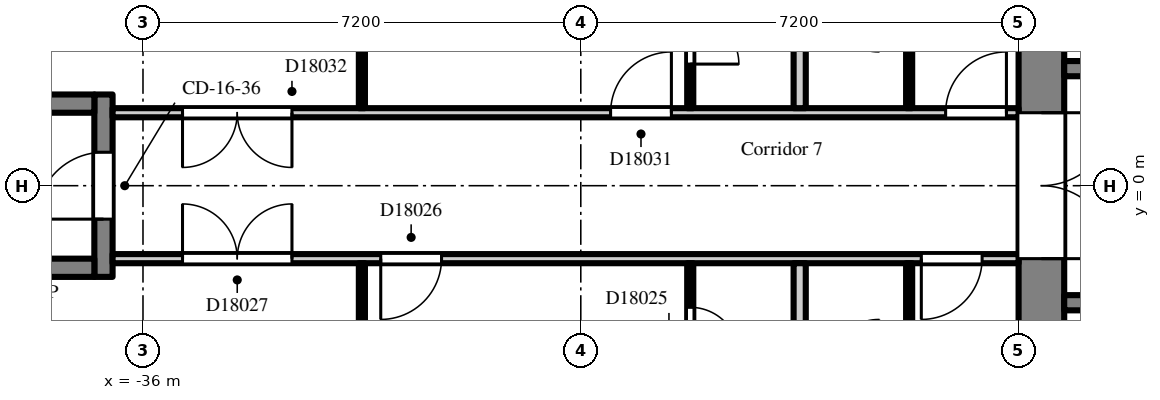
"""IFC4 building model, lengths in metres.
Left out: names, types, materials, properties, quantities, classifications, styles, units other than length and angle.
Written with IfcOpenShell. Run it as: python <this file> out.ifc"""

import sys

from ifc_helpers import new_model, si_unit, direction, frame, frame_2d, origin, place, context, subcontext, project, spatial, rectangle, extrude, element, fill, save


model = new_model("IFC4")
c1 = context("Model", 3, precision=1e-05, world=origin(), true_north=direction((0.0, 1.0)))
c2 = subcontext(c1, "Body", "Model", "MODEL_VIEW")
j1 = project(units=[si_unit("LENGTHUNIT", "METRE"), si_unit("PLANEANGLEUNIT", "RADIAN")], contexts=[c1])
p1 = place(None, origin())
s1 = spatial("IfcSite", under=j1, at=p1, CompositionType="ELEMENT")
p2 = place(p1, origin())
s2 = spatial("IfcBuilding", under=s1, at=p2, CompositionType="ELEMENT")
p3 = place(p2, frame((0.0, 0.0, 123.3)))
s3 = spatial("IfcBuildingStorey", under=s2, at=p3, CompositionType="ELEMENT", Elevation=123.3)
p4 = place(p3, frame((-21.225, -7.2, 0.0), z_axis=(0.0, 0.0, 1.0), x_axis=(0.0, 1.0, 0.0)))
e1 = element("IfcWall", 1, at=p4, inside=s3, PredefinedType="SHEAR", context=c2, shape_type="SweptSolid", body=[
    extrude(rectangle(XDim=14.4, YDim=0.75, at=frame_2d((7.2, 0.0))), origin(), (0.0, 0.0, 1.0), 2.6),
])
p5 = place(p4, frame((6.0, 0.0, 0.0)))
e2 = element("IfcOpeningElement", 2, at=p5, cuts=e1, PredefinedType="OPENING", context=c2, shape_type="SweptSolid", body=[
    extrude(rectangle(XDim=2.4, YDim=2.2, at=frame_2d((1.2, 1.1))), frame((0.0, 0.385, 0.0), z_axis=(0.0, -1.0, 0.0), x_axis=(1.0, 0.0, 0.0)), (0.0, 0.0, 1.0), 0.77),
])
p6 = place(p3, frame((-7.9, 1.925, 0.0), z_axis=(0.0, 0.0, 1.0), x_axis=(-1.0, 0.0, 0.0)))
e3 = element("IfcWall", 3, at=p6, inside=s3, PredefinedType="SHEAR", context=c2, shape_type="SweptSolid", body=[
    extrude(rectangle(XDim=12.95, YDim=0.25, at=frame_2d((6.475, 0.0))), origin(), (0.0, 0.0, 1.0), 2.6),
])
p7 = place(p6, frame((4.825, 0.0, 0.0)))
e4 = element("IfcOpeningElement", 4, at=p7, cuts=e3, PredefinedType="OPENING", context=c2, shape_type="SweptSolid", body=[
    extrude(rectangle(XDim=1.1, YDim=2.1, at=frame_2d((0.55, 1.05))), frame((0.0, 0.135, 0.0), z_axis=(0.0, -1.0, 0.0), x_axis=(1.0, 0.0, 0.0)), (0.0, 0.0, 1.0), 0.27),
])
p8 = place(p6, frame((7.025, 0.0, 0.0)))
e5 = element("IfcOpeningElement", 5, at=p8, cuts=e3, PredefinedType="OPENING", context=c2, shape_type="SweptSolid", body=[
    extrude(rectangle(XDim=1.1, YDim=2.1, at=frame_2d((0.55, 1.05))), frame((0.0, 0.135, 0.0), z_axis=(0.0, -1.0, 0.0), x_axis=(1.0, 0.0, 0.0)), (0.0, 0.0, 1.0), 0.27),
])
p9 = place(p6, frame((9.225, 0.0, 0.0)))
e6 = element("IfcOpeningElement", 6, at=p9, cuts=e3, PredefinedType="OPENING", context=c2, shape_type="SweptSolid", body=[
    extrude(rectangle(XDim=1.1, YDim=2.1, at=frame_2d((0.55, 1.05))), frame((0.0, 0.135, 0.0), z_axis=(0.0, -1.0, 0.0), x_axis=(1.0, 0.0, 0.0)), (0.0, 0.0, 1.0), 0.27),
])
p10 = place(p6, frame((0.525, 0.0, 0.0)))
e7 = element("IfcOpeningElement", 7, at=p10, cuts=e3, PredefinedType="OPENING", context=c2, shape_type="SweptSolid", body=[
    extrude(rectangle(XDim=0.9, YDim=2.1, at=frame_2d((0.45, 1.05))), frame((0.0, 0.135, 0.0), z_axis=(0.0, -1.0, 0.0), x_axis=(1.0, 0.0, 0.0)), (0.0, 0.0, 1.0), 0.27),
])
p11 = place(p6, frame((2.625, 0.0, 0.0)))
e8 = element("IfcOpeningElement", 8, at=p11, cuts=e3, PredefinedType="OPENING", context=c2, shape_type="SweptSolid", body=[
    extrude(rectangle(XDim=1.1, YDim=2.1, at=frame_2d((0.55, 1.05))), frame((0.0, 0.135, 0.0), z_axis=(0.0, -1.0, 0.0), x_axis=(1.0, 0.0, 0.0)), (0.0, 0.0, 1.0), 0.27),
])
p12 = place(p6, frame((11.525, 0.0, 0.0)))
e9 = element("IfcOpeningElement", 9, at=p12, cuts=e3, PredefinedType="OPENING", context=c2, shape_type="SweptSolid", body=[
    extrude(rectangle(XDim=0.9, YDim=2.1, at=frame_2d((0.45, 1.05))), frame((0.0, 0.135, 0.0), z_axis=(0.0, -1.0, 0.0), x_axis=(1.0, 0.0, 0.0)), (0.0, 0.0, 1.0), 0.27),
])
p13 = place(p3, frame((-7.9, -1.925, 0.0), z_axis=(0.0, 0.0, 1.0), x_axis=(-1.0, 0.0, 0.0)))
e10 = element("IfcWall", 10, at=p13, inside=s3, PredefinedType="SHEAR", context=c2, shape_type="SweptSolid", body=[
    extrude(rectangle(XDim=12.95, YDim=0.25, at=frame_2d((6.475, 0.0))), origin(), (0.0, 0.0, 1.0), 2.6),
])
p14 = place(p13, frame((0.525, 0.0, 0.0)))
e11 = element("IfcOpeningElement", 11, at=p14, cuts=e10, PredefinedType="OPENING", context=c2, shape_type="SweptSolid", body=[
    extrude(rectangle(XDim=0.9, YDim=2.1, at=frame_2d((0.45, 1.05))), frame((0.0, 0.135, 0.0), z_axis=(0.0, -1.0, 0.0), x_axis=(1.0, 0.0, 0.0)), (0.0, 0.0, 1.0), 0.27),
])
p15 = place(p13, frame((2.625, 0.0, 0.0)))
e12 = element("IfcOpeningElement", 12, at=p15, cuts=e10, PredefinedType="OPENING", context=c2, shape_type="SweptSolid", body=[
    extrude(rectangle(XDim=1.1, YDim=2.1, at=frame_2d((0.55, 1.05))), frame((0.0, 0.135, 0.0), z_axis=(0.0, -1.0, 0.0), x_axis=(1.0, 0.0, 0.0)), (0.0, 0.0, 1.0), 0.27),
])
p16 = place(p13, frame((4.925, 0.0, 0.0)))
e13 = element("IfcOpeningElement", 13, at=p16, cuts=e10, PredefinedType="OPENING", context=c2, shape_type="SweptSolid", body=[
    extrude(rectangle(XDim=0.9, YDim=2.1, at=frame_2d((0.45, 1.05))), frame((0.0, 0.135, 0.0), z_axis=(0.0, -1.0, 0.0), x_axis=(1.0, 0.0, 0.0)), (0.0, 0.0, 1.0), 0.27),
])
p17 = place(p13, frame((8.225, 0.0, 0.0)))
e14 = element("IfcOpeningElement", 14, at=p17, cuts=e10, PredefinedType="OPENING", context=c2, shape_type="SweptSolid", body=[
    extrude(rectangle(XDim=0.9, YDim=2.1, at=frame_2d((0.45, 1.05))), frame((0.0, 0.135, 0.0), z_axis=(0.0, -1.0, 0.0), x_axis=(1.0, 0.0, 0.0)), (0.0, 0.0, 1.0), 0.27),
])
p18 = place(p13, frame((11.525, 0.0, 0.0)))
e15 = element("IfcOpeningElement", 15, at=p18, cuts=e10, PredefinedType="OPENING", context=c2, shape_type="SweptSolid", body=[
    extrude(rectangle(XDim=0.9, YDim=2.1, at=frame_2d((0.45, 1.05))), frame((0.0, 0.135, 0.0), z_axis=(0.0, -1.0, 0.0), x_axis=(1.0, 0.0, 0.0)), (0.0, 0.0, 1.0), 0.27),
])
p19 = place(p3, frame((-36.65, -1.5, 0.0), z_axis=(0.0, 0.0, 1.0), x_axis=(0.0, 1.0, 0.0)))
e16 = element("IfcWall", 16, at=p19, inside=s3, PredefinedType="SHEAR", context=c2, shape_type="SweptSolid", body=[
    extrude(rectangle(XDim=3.0, YDim=0.3, at=frame_2d((1.5, 0.0))), origin(), (0.0, 0.0, 1.0), 2.6),
])
p20 = place(p19, frame((0.95, 0.0, 0.0)))
e17 = element("IfcOpeningElement", 17, at=p20, cuts=e16, PredefinedType="OPENING", context=c2, shape_type="SweptSolid", body=[
    extrude(rectangle(XDim=1.1, YDim=2.1, at=frame_2d((0.55, 1.05))), frame((0.0, 0.16, 0.0), z_axis=(0.0, -1.0, 0.0), x_axis=(1.0, 0.0, 0.0)), (0.0, 0.0, 1.0), 0.32),
])
for number, where, z_axis, x_axis in (
    (18, (-36.8, -1.35, 0.0), (0.0, 0.0, 1.0), (-1.0, 0.0, 0.0)),
    (19, (-36.8, 1.35, 0.0), (0.0, 0.0, 1.0), (-1.0, 0.0, 0.0)),
):
    element("IfcWall", number, at=place(p3, frame(where, z_axis=z_axis, x_axis=x_axis)), inside=s3, PredefinedType="SHEAR", context=c2, shape_type="SweptSolid", body=[
        extrude(rectangle(XDim=5.8, YDim=0.3, at=frame_2d((2.9, 0.0))), origin(), (0.0, 0.0, 1.0), 2.6),
    ])
p21 = place(p3, frame((-36.5, -1.2, 0.0), z_axis=(0.0, 0.0, 1.0), x_axis=(1.0, 0.0, 0.0)))
e20 = element("IfcWall", 20, at=p21, inside=s3, PredefinedType="PARTITIONING", context=c2, shape_type="SweptSolid", body=[
    extrude(rectangle(XDim=14.9, YDim=0.15, at=frame_2d((7.45, 0.0))), origin(), (0.0, 0.0, 1.0), 2.6),
])
p22 = place(p21, frame((13.3, 0.0, 0.0)))
e21 = element("IfcOpeningElement", 21, at=p22, cuts=e20, PredefinedType="OPENING", context=c2, shape_type="SweptSolid", body=[
    extrude(rectangle(XDim=1.0, YDim=2.1, at=frame_2d((0.5, 1.05))), frame((0.0, 0.085, 0.0), z_axis=(0.0, -1.0, 0.0), x_axis=(1.0, 0.0, 0.0)), (0.0, 0.0, 1.0), 0.17),
])
p23 = place(p21, frame((4.41, 0.0, 0.0)))
e22 = element("IfcOpeningElement", 22, at=p23, cuts=e20, PredefinedType="OPENING", context=c2, shape_type="SweptSolid", body=[
    extrude(rectangle(XDim=1.0, YDim=2.1, at=frame_2d((0.5, 1.05))), frame((0.0, 0.085, 0.0), z_axis=(0.0, -1.0, 0.0), x_axis=(1.0, 0.0, 0.0)), (0.0, 0.0, 1.0), 0.17),
])
p24 = place(p21, frame((1.15, 0.0, 0.0)))
e23 = element("IfcOpeningElement", 23, at=p24, cuts=e20, PredefinedType="OPENING", context=c2, shape_type="SweptSolid", body=[
    extrude(rectangle(XDim=1.8, YDim=2.1, at=frame_2d((0.9, 1.05))), frame((0.0, 0.085, 0.0), z_axis=(0.0, -1.0, 0.0), x_axis=(1.0, 0.0, 0.0)), (0.0, 0.0, 1.0), 0.17),
])
p25 = place(p3, frame((-36.5, 1.2, 0.0), z_axis=(0.0, 0.0, 1.0), x_axis=(1.0, 0.0, 0.0)))
e24 = element("IfcWall", 24, at=p25, inside=s3, PredefinedType="PARTITIONING", context=c2, shape_type="SweptSolid", body=[
    extrude(rectangle(XDim=14.9, YDim=0.15, at=frame_2d((7.45, 0.0))), origin(), (0.0, 0.0, 1.0), 2.6),
])
p26 = place(p25, frame((13.7, 0.0, 0.0)))
e25 = element("IfcOpeningElement", 25, at=p26, cuts=e24, PredefinedType="OPENING", context=c2, shape_type="SweptSolid", body=[
    extrude(rectangle(XDim=1.0, YDim=2.1, at=frame_2d((0.5, 1.05))), frame((0.0, 0.085, 0.0), z_axis=(0.0, -1.0, 0.0), x_axis=(1.0, 0.0, 0.0)), (0.0, 0.0, 1.0), 0.17),
])
p27 = place(p25, frame((8.19, 0.0, 0.0)))
e26 = element("IfcOpeningElement", 26, at=p27, cuts=e24, PredefinedType="OPENING", context=c2, shape_type="SweptSolid", body=[
    extrude(rectangle(XDim=1.0, YDim=2.1, at=frame_2d((0.5, 1.05))), frame((0.0, 0.085, 0.0), z_axis=(0.0, -1.0, 0.0), x_axis=(1.0, 0.0, 0.0)), (0.0, 0.0, 1.0), 0.17),
])
p28 = place(p25, frame((1.15, 0.0, 0.0)))
e27 = element("IfcOpeningElement", 27, at=p28, cuts=e24, PredefinedType="OPENING", context=c2, shape_type="SweptSolid", body=[
    extrude(rectangle(XDim=1.8, YDim=2.1, at=frame_2d((0.9, 1.05))), frame((0.0, 0.085, 0.0), z_axis=(0.0, -1.0, 0.0), x_axis=(1.0, 0.0, 0.0)), (0.0, 0.0, 1.0), 0.17),
])
for number, where, z_axis, x_axis in (
    (28, (-32.4, -6.9, 0.0), (0.0, 0.0, 1.0), (0.0, 1.0, 0.0)),
    (29, (-32.4, 1.275, 0.0), (0.0, 0.0, 1.0), (0.0, 1.0, 0.0)),
):
    element("IfcWall", number, at=place(p3, frame(where, z_axis=z_axis, x_axis=x_axis)), inside=s3, PredefinedType="PARTITIONING", context=c2, shape_type="SweptSolid", body=[
        extrude(rectangle(XDim=5.625, YDim=0.1, at=frame_2d((2.812, 0.0))), origin(), (0.0, 0.0, 1.0), 2.6),
    ])
p29 = place(p3, frame((-27.0, -3.65, 0.0), z_axis=(0.0, 0.0, 1.0), x_axis=(0.0, 1.0, 0.0)))
e30 = element("IfcWall", 30, at=p29, inside=s3, PredefinedType="PARTITIONING", context=c2, shape_type="SweptSolid", body=[
    extrude(rectangle(XDim=2.375, YDim=0.1, at=frame_2d((1.188, 0.0))), origin(), (0.0, 0.0, 1.0), 2.6),
])
p30 = place(p29, frame((0.85, 0.0, 0.0)))
e31 = element("IfcOpeningElement", 31, at=p30, cuts=e30, PredefinedType="OPENING", context=c2, shape_type="SweptSolid", body=[
    extrude(rectangle(XDim=0.8, YDim=2.1, at=frame_2d((0.4, 1.05))), frame((0.0, 0.06, 0.0), z_axis=(0.0, -1.0, 0.0), x_axis=(1.0, 0.0, 0.0)), (0.0, 0.0, 1.0), 0.12),
])
p31 = place(p3, frame((-27.0, 1.275, 0.0), z_axis=(0.0, 0.0, 1.0), x_axis=(0.0, 1.0, 0.0)))
e32 = element("IfcWall", 32, at=p31, inside=s3, PredefinedType="PARTITIONING", context=c2, shape_type="SweptSolid", body=[
    extrude(rectangle(XDim=2.375, YDim=0.1, at=frame_2d((1.188, 0.0))), origin(), (0.0, 0.0, 1.0), 2.6),
])
p32 = place(p31, frame((0.725, 0.0, 0.0)))
e33 = element("IfcOpeningElement", 33, at=p32, cuts=e32, PredefinedType="OPENING", context=c2, shape_type="SweptSolid", body=[
    extrude(rectangle(XDim=0.8, YDim=2.1, at=frame_2d((0.4, 1.05))), frame((0.0, 0.06, 0.0), z_axis=(0.0, -1.0, 0.0), x_axis=(1.0, 0.0, 0.0)), (0.0, 0.0, 1.0), 0.12),
])
for number, where, z_axis, x_axis in (
    (34, (-25.2, -6.9, 0.0), (0.0, 0.0, 1.0), (0.0, 1.0, 0.0)),
    (35, (-25.2, 1.275, 0.0), (0.0, 0.0, 1.0), (0.0, 1.0, 0.0)),
):
    element("IfcWall", number, at=place(p3, frame(where, z_axis=z_axis, x_axis=x_axis)), inside=s3, PredefinedType="PARTITIONING", context=c2, shape_type="SweptSolid", body=[
        extrude(rectangle(XDim=5.625, YDim=0.2, at=frame_2d((2.812, 0.0))), origin(), (0.0, 0.0, 1.0), 2.6),
    ])
for number, where, z_axis, x_axis in (
    (36, (-23.4, -2.95, 0.0), (0.0, 0.0, 1.0), (0.0, 1.0, 0.0)),
    (37, (-23.4, 1.275, 0.0), (0.0, 0.0, 1.0), (0.0, 1.0, 0.0)),
):
    element("IfcWall", number, at=place(p3, frame(where, z_axis=z_axis, x_axis=x_axis)), inside=s3, PredefinedType="PARTITIONING", context=c2, shape_type="SweptSolid", body=[
        extrude(rectangle(XDim=1.675, YDim=0.1, at=frame_2d((0.837, 0.0))), origin(), (0.0, 0.0, 1.0), 2.6),
    ])
p33 = place(p5, frame((2.4, 0.0, 0.0), z_axis=(0.0, 0.0, 1.0), x_axis=(-1.0, 0.0, 0.0)))
e38 = element("IfcDoor", 38, at=p33, inside=s3, OperationType="DOUBLE_DOOR_DOUBLE_SWING", PredefinedType="DOOR", context=c2, shape_type="SweptSolid", body=[
    extrude(rectangle(XDim=2.4, YDim=2.2, at=frame_2d((1.2, 1.1))), frame((0.0, 0.025, 0.0), z_axis=(0.0, -1.0, 0.0), x_axis=(1.0, 0.0, 0.0)), (0.0, 0.0, 1.0), 0.05),
])
fill(e2, e38)
p34 = place(p20, origin())
e39 = element("IfcDoor", 39, at=p34, inside=s3, OperationType="SINGLE_SWING_LEFT", PredefinedType="DOOR", context=c2, shape_type="SweptSolid", body=[
    extrude(rectangle(XDim=1.1, YDim=2.1, at=frame_2d((0.55, 1.05))), frame((0.0, 0.025, 0.0), z_axis=(0.0, -1.0, 0.0), x_axis=(1.0, 0.0, 0.0)), (0.0, 0.0, 1.0), 0.05),
])
fill(e17, e39)
p35 = place(p22, frame((1.0, 0.0, 0.0), z_axis=(0.0, 0.0, 1.0), x_axis=(-1.0, 0.0, 0.0)))
e40 = element("IfcDoor", 40, at=p35, inside=s3, OperationType="SINGLE_SWING_RIGHT", PredefinedType="DOOR", context=c2, shape_type="SweptSolid", body=[
    extrude(rectangle(XDim=1.0, YDim=2.1, at=frame_2d((0.5, 1.05))), frame((0.0, 0.025, 0.0), z_axis=(0.0, -1.0, 0.0), x_axis=(1.0, 0.0, 0.0)), (0.0, 0.0, 1.0), 0.05),
])
fill(e21, e40)
p36 = place(p30, frame((0.8, 0.0, 0.0), z_axis=(0.0, 0.0, 1.0), x_axis=(-1.0, 0.0, 0.0)))
e41 = element("IfcDoor", 41, at=p36, inside=s3, OperationType="SINGLE_SWING_RIGHT", PredefinedType="DOOR", context=c2, shape_type="SweptSolid", body=[
    extrude(rectangle(XDim=0.8, YDim=2.1, at=frame_2d((0.4, 1.05))), frame((0.0, 0.025, 0.0), z_axis=(0.0, -1.0, 0.0), x_axis=(1.0, 0.0, 0.0)), (0.0, 0.0, 1.0), 0.05),
])
fill(e31, e41)
p37 = place(p23, frame((1.0, 0.0, 0.0), z_axis=(0.0, 0.0, 1.0), x_axis=(-1.0, 0.0, 0.0)))
e42 = element("IfcDoor", 42, at=p37, inside=s3, OperationType="SINGLE_SWING_RIGHT", PredefinedType="DOOR", context=c2, shape_type="SweptSolid", body=[
    extrude(rectangle(XDim=1.0, YDim=2.1, at=frame_2d((0.5, 1.05))), frame((0.0, 0.025, 0.0), z_axis=(0.0, -1.0, 0.0), x_axis=(1.0, 0.0, 0.0)), (0.0, 0.0, 1.0), 0.05),
])
fill(e22, e42)
p38 = place(p24, origin())
e43 = element("IfcDoor", 43, at=p38, inside=s3, OperationType="DOUBLE_DOOR_DOUBLE_SWING", PredefinedType="DOOR", context=c2, shape_type="SweptSolid", body=[
    extrude(rectangle(XDim=1.8, YDim=2.1, at=frame_2d((0.9, 1.05))), frame((0.0, 0.025, 0.0), z_axis=(0.0, -1.0, 0.0), x_axis=(1.0, 0.0, 0.0)), (0.0, 0.0, 1.0), 0.05),
])
fill(e23, e43)
p39 = place(p26, origin())
e44 = element("IfcDoor", 44, at=p39, inside=s3, OperationType="SINGLE_SWING_RIGHT", PredefinedType="DOOR", context=c2, shape_type="SweptSolid", body=[
    extrude(rectangle(XDim=1.0, YDim=2.1, at=frame_2d((0.5, 1.05))), frame((0.0, 0.025, 0.0), z_axis=(0.0, -1.0, 0.0), x_axis=(1.0, 0.0, 0.0)), (0.0, 0.0, 1.0), 0.05),
])
fill(e25, e44)
p40 = place(p32, frame((0.8, 0.0, 0.0), z_axis=(0.0, 0.0, 1.0), x_axis=(-1.0, 0.0, 0.0)))
e45 = element("IfcDoor", 45, at=p40, inside=s3, OperationType="SINGLE_SWING_RIGHT", PredefinedType="DOOR", context=c2, shape_type="SweptSolid", body=[
    extrude(rectangle(XDim=0.8, YDim=2.1, at=frame_2d((0.4, 1.05))), frame((0.0, 0.025, 0.0), z_axis=(0.0, -1.0, 0.0), x_axis=(1.0, 0.0, 0.0)), (0.0, 0.0, 1.0), 0.05),
])
fill(e33, e45)
p41 = place(p27, origin())
e46 = element("IfcDoor", 46, at=p41, inside=s3, OperationType="SINGLE_SWING_RIGHT", PredefinedType="DOOR", context=c2, shape_type="SweptSolid", body=[
    extrude(rectangle(XDim=1.0, YDim=2.1, at=frame_2d((0.5, 1.05))), frame((0.0, 0.025, 0.0), z_axis=(0.0, -1.0, 0.0), x_axis=(1.0, 0.0, 0.0)), (0.0, 0.0, 1.0), 0.05),
])
fill(e26, e46)
p42 = place(p28, frame((1.8, 0.0, 0.0), z_axis=(0.0, 0.0, 1.0), x_axis=(-1.0, 0.0, 0.0)))
e47 = element("IfcDoor", 47, at=p42, inside=s3, OperationType="DOUBLE_DOOR_DOUBLE_SWING", PredefinedType="DOOR", context=c2, shape_type="SweptSolid", body=[
    extrude(rectangle(XDim=1.8, YDim=2.1, at=frame_2d((0.9, 1.05))), frame((0.0, 0.025, 0.0), z_axis=(0.0, -1.0, 0.0), x_axis=(1.0, 0.0, 0.0)), (0.0, 0.0, 1.0), 0.05),
])
fill(e27, e47)
save(model, sys.argv[1])
